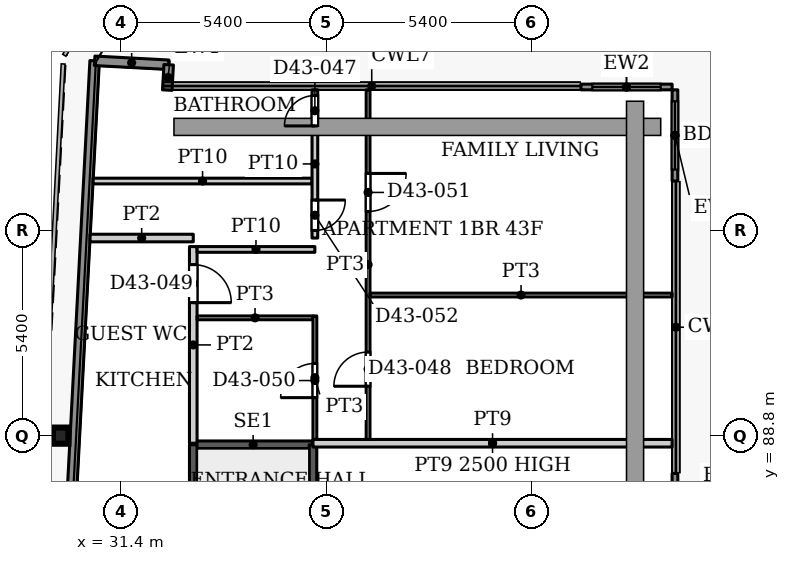
"""IFC4 building model, lengths in metres.
Left out: names, types, materials, properties, quantities, classifications, styles, units other than length and angle.
Written with IfcOpenShell. Run it as: python <this file> out.ifc"""

import sys

from ifc_helpers import new_model, si_unit, direction, frame, frame_2d, origin, origin_2d, place, context, subcontext, project, spatial, rectangle, i_section, extrude, source, transform, mapped, element, fill, save


model = new_model("IFC4")
c1 = context("Model", 3, precision=1e-05, world=origin(), true_north=direction((0.0, 1.0)))
c2 = subcontext(c1, "Body", "Model", "MODEL_VIEW")
j1 = project(units=[si_unit("LENGTHUNIT", "METRE"), si_unit("PLANEANGLEUNIT", "RADIAN")], contexts=[c1])
p1 = place(None, origin())
s1 = spatial("IfcSite", under=j1, at=p1, CompositionType="ELEMENT")
p2 = place(p1, origin())
s2 = spatial("IfcBuilding", under=s1, at=p2, CompositionType="ELEMENT")
p3 = place(p2, frame((0.0, 0.0, 183.8)))
s3 = spatial("IfcBuildingStorey", under=s2, at=p3, CompositionType="ELEMENT", Elevation=183.8)
p4 = place(p3, frame((29.811, 88.8, 0.0), z_axis=(0.0, 0.0, 1.0), x_axis=(1.0, 0.0, 0.0)))
e1 = element("IfcColumn", 1, at=p4, inside=s3, PredefinedType="COLUMN", context=c2, shape_type="SweptSolid", body=[
    extrude(i_section(OverallWidth=0.409, OverallDepth=0.425, WebThickness=0.033, FlangeThickness=0.052, FilletRadius=0.013, at=origin_2d()), origin(), (0.0, 0.0, 1.0), 3.9),
])
p5 = place(p3, frame((27.195, 31.969, 0.0), z_axis=(0.0, 0.0, 1.0), x_axis=(0.052554995867, 0.998618031286, 0.0)))
e2 = element("IfcWall", 2, at=p5, inside=s3, PredefinedType="SOLIDWALL", context=c2, shape_type="SweptSolid", body=[
    extrude(rectangle(XDim=66.787, YDim=0.25, at=frame_2d((33.394, 0.0))), origin(), (0.0, 0.0, 1.0), 3.75),
])
p6 = place(p3, frame((30.705, 98.664, 0.0), z_axis=(0.0, 0.0, 1.0), x_axis=(0.998577785791, -0.053314216913, 0.0)))
e3 = element("IfcWall", 3, at=p6, inside=s3, PredefinedType="SOLIDWALL", context=c2, shape_type="SweptSolid", body=[
    extrude(rectangle(XDim=1.951, YDim=0.25, at=frame_2d((0.975, 0.0))), origin(), (0.0, 0.0, 1.0), 3.75),
])
p7 = place(p3, frame((32.653, 98.56, 0.0), z_axis=(0.0, 0.0, 1.0), x_axis=(-0.054093451632, -0.998535877418, 0.0)))
e4 = element("IfcWall", 4, at=p7, inside=s3, PredefinedType="SOLIDWALL", context=c2, shape_type="SweptSolid", body=[
    extrude(rectangle(XDim=0.668, YDim=0.25, at=frame_2d((0.334, 0.0))), origin(), (0.0, 0.0, 1.0), 3.75),
])
p8 = place(p3, frame((43.5, 97.975, 0.0), z_axis=(0.0, 0.0, 1.0), x_axis=(1.0, 0.0, 0.0)))
e5 = element("IfcWall", 5, at=p8, inside=s3, PredefinedType="SOLIDWALL", context=c2, shape_type="SweptSolid", body=[
    extrude(rectangle(XDim=2.4, YDim=0.15, at=frame_2d((1.2, 0.0))), origin(), (0.0, 0.0, 1.0), 3.75),
])
p9 = place(p8, frame((0.3, 0.0, 0.0)))
e6 = element("IfcOpeningElement", 6, at=p9, cuts=e5, PredefinedType="OPENING", context=c2, shape_type="SweptSolid", body=[
    extrude(rectangle(XDim=1.8, YDim=2.4, at=frame_2d((0.9, 1.2))), frame((0.0, 0.085, 0.0), z_axis=(0.0, -1.0, 0.0), x_axis=(1.0, 0.0, 0.0)), (0.0, 0.0, 1.0), 0.17),
])
p10 = place(p3, frame((45.975, 97.9, 0.0), z_axis=(0.0, 0.0, 1.0), x_axis=(0.0, -1.0, 0.0)))
e7 = element("IfcWall", 7, at=p10, inside=s3, PredefinedType="SOLIDWALL", context=c2, shape_type="SweptSolid", body=[
    extrude(rectangle(XDim=2.4, YDim=0.15, at=frame_2d((1.2, 0.0))), origin(), (0.0, 0.0, 1.0), 3.75),
])
p11 = place(p10, frame((0.3, 0.0, 0.0)))
e8 = element("IfcOpeningElement", 8, at=p11, cuts=e7, PredefinedType="OPENING", context=c2, shape_type="SweptSolid", body=[
    extrude(rectangle(XDim=1.8, YDim=2.4, at=frame_2d((0.9, 1.2))), frame((0.0, 0.085, 0.0), z_axis=(0.0, -1.0, 0.0), x_axis=(1.0, 0.0, 0.0)), (0.0, 0.0, 1.0), 0.17),
])
p12 = place(p3, frame((45.975, 87.806, 0.0), z_axis=(0.0, 0.0, 1.0), x_axis=(0.0, -1.0, 0.0)))
e9 = element("IfcWall", 9, at=p12, inside=s3, PredefinedType="SOLIDWALL", context=c2, shape_type="SweptSolid", body=[
    extrude(rectangle(XDim=2.4, YDim=0.15, at=frame_2d((1.2, 0.0))), origin(), (0.0, 0.0, 1.0), 3.75),
])
p13 = place(p12, frame((0.3, 0.0, 0.0)))
e10 = element("IfcOpeningElement", 10, at=p13, cuts=e9, PredefinedType="OPENING", context=c2, shape_type="SweptSolid", body=[
    extrude(rectangle(XDim=1.8, YDim=2.4, at=frame_2d((0.9, 1.2))), frame((0.0, 0.085, 0.0), z_axis=(0.0, -1.0, 0.0), x_axis=(1.0, 0.0, 0.0)), (0.0, 0.0, 1.0), 0.17),
])
p14 = place(p3, frame((33.3, 88.56, 0.0), z_axis=(0.0, 0.0, 1.0), x_axis=(1.0, 0.0, 0.0)))
e11 = element("IfcWall", 11, at=p14, inside=s3, PredefinedType="SHEAR", context=c2, shape_type="SweptSolid", body=[
    extrude(rectangle(XDim=3.15, YDim=0.2, at=frame_2d((1.575, 0.0))), origin(), (0.0, 0.0, 1.0), 3.9),
])
p15 = place(p3, frame((33.3, 79.4, 0.0), z_axis=(0.0, 0.0, 1.0), x_axis=(0.0, 1.0, 0.0)))
e12 = element("IfcWall", 12, at=p15, inside=s3, PredefinedType="SHEAR", context=c2, shape_type="SweptSolid", body=[
    extrude(rectangle(XDim=9.16, YDim=0.2, at=frame_2d((4.58, 0.0))), origin(), (0.0, 0.0, 1.0), 3.9),
])
p16 = place(p15, frame((0.35, 0.0, 0.0)))
e13 = element("IfcOpeningElement", 13, at=p16, cuts=e12, PredefinedType="OPENING", context=c2, shape_type="SweptSolid", body=[
    extrude(rectangle(XDim=1.1, YDim=2.2, at=frame_2d((0.55, 1.1))), frame((0.0, 0.11, 0.0), z_axis=(0.0, -1.0, 0.0), x_axis=(1.0, 0.0, 0.0)), (0.0, 0.0, 1.0), 0.22),
])
p17 = place(p3, frame((36.45, 79.4, 0.0), z_axis=(0.0, 0.0, 1.0), x_axis=(0.0, 1.0, 0.0)))
e14 = element("IfcWall", 14, at=p17, inside=s3, PredefinedType="SHEAR", context=c2, shape_type="SweptSolid", body=[
    extrude(rectangle(XDim=9.16, YDim=0.2, at=frame_2d((4.58, 0.0))), origin(), (0.0, 0.0, 1.0), 3.9),
])
p18 = place(p3, frame((30.664, 95.5, 0.0), z_axis=(0.0, 0.0, 1.0), x_axis=(1.0, 0.0, 0.0)))
e15 = element("IfcWall", 15, at=p18, inside=s3, PredefinedType="PARTITIONING", context=c2, shape_type="SweptSolid", body=[
    extrude(rectangle(XDim=5.761, YDim=0.15, at=frame_2d((2.88, 0.0))), origin(), (0.0, 0.0, 1.0), 3.6),
])
p19 = place(p3, frame((30.585, 94.0, 0.0), z_axis=(0.0, 0.0, 1.0), x_axis=(1.0, 0.0, 0.0)))
e16 = element("IfcWall", 16, at=p19, inside=s3, PredefinedType="PARTITIONING", context=c2, shape_type="SweptSolid", body=[
    extrude(rectangle(XDim=2.715, YDim=0.2, at=frame_2d((1.358, 0.0))), origin(), (0.0, 0.0, 1.0), 3.6),
])
p20 = place(p3, frame((33.3, 88.6, 0.0), z_axis=(0.0, 0.0, 1.0), x_axis=(0.0, 1.0, 0.0)))
e17 = element("IfcWall", 17, at=p20, inside=s3, PredefinedType="PARTITIONING", context=c2, shape_type="SweptSolid", body=[
    extrude(rectangle(XDim=5.175, YDim=0.2, at=frame_2d((2.587, 0.0))), origin(), (0.0, 0.0, 1.0), 3.6),
])
p21 = place(p20, frame((3.7, 0.0, 0.0)))
e18 = element("IfcOpeningElement", 18, at=p21, cuts=e17, PredefinedType="OPENING", context=c2, shape_type="SweptSolid", body=[
    extrude(rectangle(XDim=1.0, YDim=2.1, at=frame_2d((0.5, 1.05))), frame((0.0, 0.11, 0.0), z_axis=(0.0, -1.0, 0.0), x_axis=(1.0, 0.0, 0.0)), (0.0, 0.0, 1.0), 0.22),
])
p22 = place(p3, frame((33.4, 91.9, 0.0), z_axis=(0.0, 0.0, 1.0), x_axis=(1.0, 0.0, 0.0)))
e19 = element("IfcWall", 19, at=p22, inside=s3, PredefinedType="PARTITIONING", context=c2, shape_type="SweptSolid", body=[
    extrude(rectangle(XDim=3.05, YDim=0.1, at=frame_2d((1.525, 0.0))), origin(), (0.0, 0.0, 1.0), 3.6),
])
p23 = place(p3, frame((33.4, 93.7, 0.0), z_axis=(0.0, 0.0, 1.0), x_axis=(1.0, 0.0, 0.0)))
e20 = element("IfcWall", 20, at=p23, inside=s3, PredefinedType="PARTITIONING", context=c2, shape_type="SweptSolid", body=[
    extrude(rectangle(XDim=3.1, YDim=0.15, at=frame_2d((1.55, 0.0))), origin(), (0.0, 0.0, 1.0), 3.6),
])
p24 = place(p3, frame((36.45, 88.6, 0.0), z_axis=(0.0, 0.0, 1.0), x_axis=(1.0, 0.0, 0.0)))
e21 = element("IfcWall", 21, at=p24, inside=s3, PredefinedType="PARTITIONING", context=c2, shape_type="SweptSolid", body=[
    extrude(rectangle(XDim=9.45, YDim=0.2, at=frame_2d((4.725, 0.0))), origin(), (0.0, 0.0, 1.0), 2.5),
])
p25 = place(p3, frame((36.5, 88.7, 0.0), z_axis=(0.0, 0.0, 1.0), x_axis=(0.0, 1.0, 0.0)))
e22 = element("IfcWall", 22, at=p25, inside=s3, PredefinedType="PARTITIONING", context=c2, shape_type="SweptSolid", body=[
    extrude(rectangle(XDim=3.25, YDim=0.1, at=frame_2d((1.625, 0.0))), origin(), (0.0, 0.0, 1.0), 3.6),
])
p26 = place(p25, frame((1.1, 0.0, 0.0)))
e23 = element("IfcOpeningElement", 23, at=p26, cuts=e22, PredefinedType="OPENING", context=c2, shape_type="SweptSolid", body=[
    extrude(rectangle(XDim=0.9, YDim=2.1, at=frame_2d((0.45, 1.05))), frame((0.0, 0.06, 0.0), z_axis=(0.0, -1.0, 0.0), x_axis=(1.0, 0.0, 0.0)), (0.0, 0.0, 1.0), 0.12),
])
p27 = place(p3, frame((36.5, 94.0, 0.0), z_axis=(0.0, 0.0, 1.0), x_axis=(0.0, 1.0, 0.0)))
e24 = element("IfcWall", 24, at=p27, inside=s3, PredefinedType="PARTITIONING", context=c2, shape_type="SweptSolid", body=[
    extrude(rectangle(XDim=3.9, YDim=0.15, at=frame_2d((1.95, 0.0))), origin(), (0.0, 0.0, 1.0), 3.6),
])
p28 = place(p27, frame((2.95, 0.0, 0.0)))
e25 = element("IfcOpeningElement", 25, at=p28, cuts=e24, PredefinedType="OPENING", context=c2, shape_type="SweptSolid", body=[
    extrude(rectangle(XDim=0.8, YDim=2.1, at=frame_2d((0.4, 1.05))), frame((0.0, 0.085, 0.0), z_axis=(0.0, -1.0, 0.0), x_axis=(1.0, 0.0, 0.0)), (0.0, 0.0, 1.0), 0.17),
])
p29 = place(p27, frame((0.2, 0.0, 0.0)))
e26 = element("IfcOpeningElement", 26, at=p29, cuts=e24, PredefinedType="OPENING", context=c2, shape_type="SweptSolid", body=[
    extrude(rectangle(XDim=0.8, YDim=2.1, at=frame_2d((0.4, 1.05))), frame((0.0, 0.085, 0.0), z_axis=(0.0, -1.0, 0.0), x_axis=(1.0, 0.0, 0.0)), (0.0, 0.0, 1.0), 0.17),
])
p30 = place(p3, frame((37.9, 88.7, 0.0), z_axis=(0.0, 0.0, 1.0), x_axis=(0.0, 1.0, 0.0)))
e27 = element("IfcWall", 27, at=p30, inside=s3, PredefinedType="PARTITIONING", context=c2, shape_type="SweptSolid", body=[
    extrude(rectangle(XDim=9.2, YDim=0.1, at=frame_2d((4.6, 0.0))), origin(), (0.0, 0.0, 1.0), 3.6),
])
p31 = place(p30, frame((1.4, 0.0, 0.0)))
e28 = element("IfcOpeningElement", 28, at=p31, cuts=e27, PredefinedType="OPENING", context=c2, shape_type="SweptSolid", body=[
    extrude(rectangle(XDim=0.9, YDim=2.1, at=frame_2d((0.45, 1.05))), frame((0.0, 0.06, 0.0), z_axis=(0.0, -1.0, 0.0), x_axis=(1.0, 0.0, 0.0)), (0.0, 0.0, 1.0), 0.12),
])
p32 = place(p30, frame((6.0, 0.0, 0.0)))
e29 = element("IfcOpeningElement", 29, at=p32, cuts=e27, PredefinedType="OPENING", context=c2, shape_type="SweptSolid", body=[
    extrude(rectangle(XDim=1.0, YDim=2.1, at=frame_2d((0.5, 1.05))), frame((0.0, 0.06, 0.0), z_axis=(0.0, -1.0, 0.0), x_axis=(1.0, 0.0, 0.0)), (0.0, 0.0, 1.0), 0.12),
])
p33 = place(p3, frame((37.95, 92.5, 0.0), z_axis=(0.0, 0.0, 1.0), x_axis=(1.0, 0.0, 0.0)))
e30 = element("IfcWall", 30, at=p33, inside=s3, PredefinedType="PARTITIONING", context=c2, shape_type="SweptSolid", body=[
    extrude(rectangle(XDim=7.95, YDim=0.1, at=frame_2d((3.975, 0.0))), origin(), (0.0, 0.0, 1.0), 3.6),
])
m1 = source(origin(), c2, "Body", "SweptSolid", [
    extrude(rectangle(XDim=1.8, YDim=2.4, at=frame_2d((0.9, 1.2))), frame((0.0, 0.025, 0.0), z_axis=(0.0, -1.0, 0.0), x_axis=(1.0, 0.0, 0.0)), (0.0, 0.0, 1.0), 0.05),
])
p34 = place(p9, origin())
e31 = element("IfcDoor", 31, at=p34, inside=s3, OperationType="SLIDING_TO_LEFT", PredefinedType="DOOR", context=c2, shape_type="MappedRepresentation", body=[
    mapped(m1, transform((0.0, 0.0, 0.0), x_axis=(1.0, 0.0, 0.0), y_axis=(0.0, 1.0, 0.0), z_axis=(0.0, 0.0, 1.0), scale=1.0)),
])
fill(e6, e31)
p35 = place(p11, origin())
e32 = element("IfcDoor", 32, at=p35, inside=s3, OperationType="SLIDING_TO_LEFT", PredefinedType="DOOR", context=c2, shape_type="MappedRepresentation", body=[
    mapped(m1, transform((0.0, 0.0, 0.0), x_axis=(1.0, 0.0, 0.0), y_axis=(0.0, 1.0, 0.0), z_axis=(0.0, 0.0, 1.0), scale=1.0)),
])
fill(e8, e32)
m2 = source(origin(), c2, "Body", "SweptSolid", [
    extrude(rectangle(XDim=0.8, YDim=2.1, at=frame_2d((0.4, 1.05))), frame((0.0, 0.025, 0.0), z_axis=(0.0, -1.0, 0.0), x_axis=(1.0, 0.0, 0.0)), (0.0, 0.0, 1.0), 0.05),
])
p36 = place(p28, origin())
e33 = element("IfcDoor", 33, at=p36, inside=s3, OperationType="SINGLE_SWING_LEFT", PredefinedType="DOOR", context=c2, shape_type="MappedRepresentation", body=[
    mapped(m2, transform((0.0, 0.0, 0.0), x_axis=(1.0, 0.0, 0.0), y_axis=(0.0, 1.0, 0.0), z_axis=(0.0, 0.0, 1.0), scale=1.0)),
])
fill(e25, e33)
m3 = source(origin(), c2, "Body", "SweptSolid", [
    extrude(rectangle(XDim=0.9, YDim=2.1, at=frame_2d((0.45, 1.05))), frame((0.0, 0.025, 0.0), z_axis=(0.0, -1.0, 0.0), x_axis=(1.0, 0.0, 0.0)), (0.0, 0.0, 1.0), 0.05),
])
p37 = place(p31, origin())
e34 = element("IfcDoor", 34, at=p37, inside=s3, OperationType="SINGLE_SWING_LEFT", PredefinedType="DOOR", context=c2, shape_type="MappedRepresentation", body=[
    mapped(m3, transform((0.0, 0.0, 0.0), x_axis=(1.0, 0.0, 0.0), y_axis=(0.0, 1.0, 0.0), z_axis=(0.0, 0.0, 1.0), scale=1.0)),
])
fill(e28, e34)
m4 = source(origin(), c2, "Body", "SweptSolid", [
    extrude(rectangle(XDim=1.0, YDim=2.1, at=frame_2d((0.5, 1.05))), frame((0.0, 0.025, 0.0), z_axis=(0.0, -1.0, 0.0), x_axis=(1.0, 0.0, 0.0)), (0.0, 0.0, 1.0), 0.05),
])
p38 = place(p21, origin())
e35 = element("IfcDoor", 35, at=p38, inside=s3, OperationType="SINGLE_SWING_RIGHT", PredefinedType="DOOR", context=c2, shape_type="MappedRepresentation", body=[
    mapped(m4, transform((0.0, 0.0, 0.0), x_axis=(1.0, 0.0, 0.0), y_axis=(0.0, 1.0, 0.0), z_axis=(0.0, 0.0, 1.0), scale=1.0)),
])
fill(e18, e35)
p39 = place(p26, origin())
e36 = element("IfcDoor", 36, at=p39, inside=s3, OperationType="SINGLE_SWING_LEFT", PredefinedType="DOOR", context=c2, shape_type="MappedRepresentation", body=[
    mapped(m3, transform((0.0, 0.0, 0.0), x_axis=(1.0, 0.0, 0.0), y_axis=(0.0, 1.0, 0.0), z_axis=(0.0, 0.0, 1.0), scale=1.0)),
])
fill(e23, e36)
m5 = source(origin(), c2, "Body", "SweptSolid", [
    extrude(rectangle(XDim=1.0, YDim=2.1, at=frame_2d((0.5, 1.05))), frame((0.0, 0.025, 0.0), z_axis=(0.0, -1.0, 0.0), x_axis=(1.0, 0.0, 0.0)), (0.0, 0.0, 1.0), 0.05),
])
p40 = place(p32, origin())
e37 = element("IfcDoor", 37, at=p40, inside=s3, OperationType="SINGLE_SWING_RIGHT", PredefinedType="DOOR", context=c2, shape_type="MappedRepresentation", body=[
    mapped(m5, transform((0.0, 0.0, 0.0), x_axis=(1.0, 0.0, 0.0), y_axis=(0.0, 1.0, 0.0), z_axis=(0.0, 0.0, 1.0), scale=1.0)),
])
fill(e29, e37)
p41 = place(p29, origin())
e38 = element("IfcDoor", 38, at=p41, inside=s3, OperationType="SINGLE_SWING_RIGHT", PredefinedType="DOOR", context=c2, shape_type="MappedRepresentation", body=[
    mapped(m2, transform((0.0, 0.0, 0.0), x_axis=(1.0, 0.0, 0.0), y_axis=(0.0, 1.0, 0.0), z_axis=(0.0, 0.0, 1.0), scale=1.0)),
])
fill(e26, e38)
save(model, sys.argv[1])
